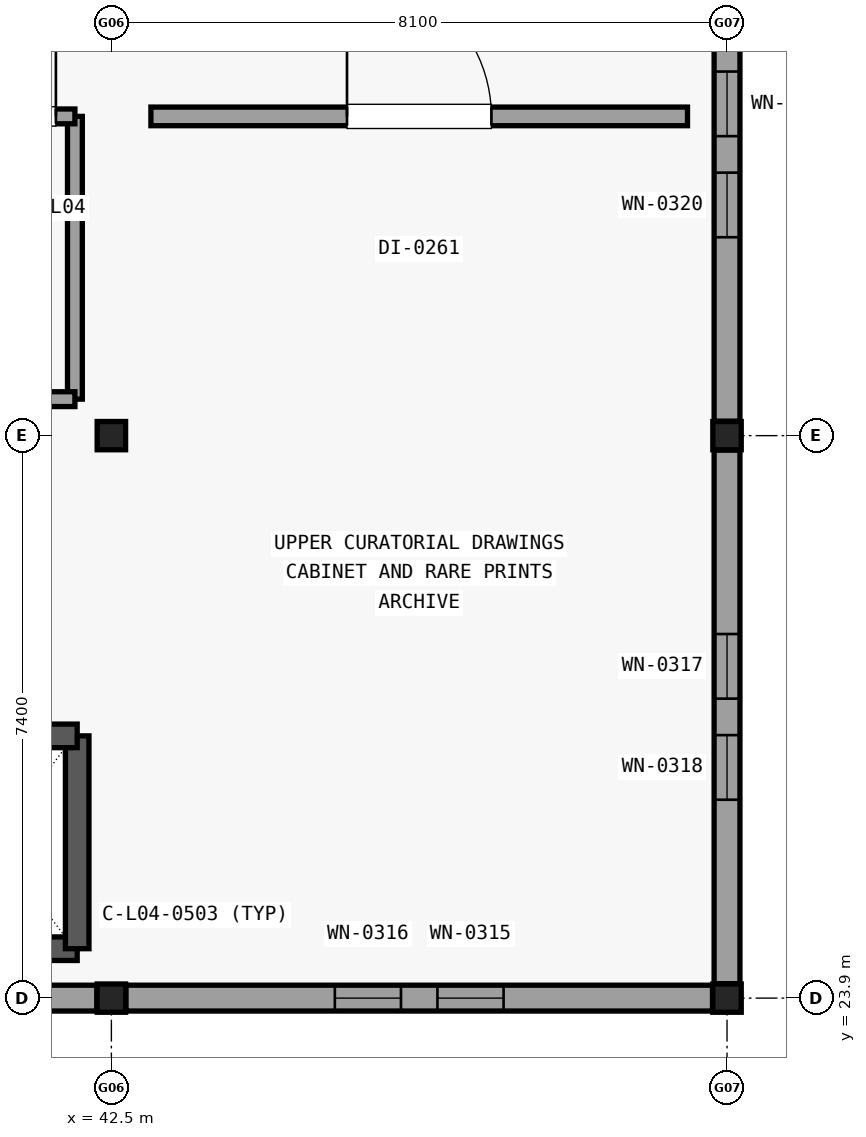
"""IFC4 building model, lengths in metres.
Left out: names, types, materials, properties, quantities, classifications, styles, units other than length and angle.
Written with IfcOpenShell. Run it as: python <this file> out.ifc"""

import sys

from ifc_helpers import new_model, si_unit, direction, frame, frame_2d, origin, origin_2d, place, context, subcontext, project, spatial, rectangle, i_section, extrude, element, fill, save


model = new_model("IFC4")
c1 = context("Model", 3, precision=1e-05, world=origin(), true_north=direction((0.0, 1.0)))
c2 = subcontext(c1, "Body", "Model", "MODEL_VIEW")
j1 = project(units=[si_unit("LENGTHUNIT", "METRE"), si_unit("PLANEANGLEUNIT", "RADIAN")], contexts=[c1])
p1 = place(None, origin())
s1 = spatial("IfcSite", under=j1, at=p1, CompositionType="ELEMENT")
p2 = place(p1, origin())
s2 = spatial("IfcBuilding", under=s1, at=p2, CompositionType="ELEMENT")
p3 = place(p2, frame((0.0, 0.0, 17.4)))
s3 = spatial("IfcBuildingStorey", under=s2, at=p3, CompositionType="ELEMENT", Elevation=17.4)
for number, where, z_axis, x_axis in (
    (1, (42.5, 23.9, 0.0), (0.0, 0.0, 1.0), (1.0, 0.0, 0.0)),
    (2, (42.5, 31.3, 0.0), (0.0, 0.0, 1.0), (1.0, 0.0, 0.0)),
    (3, (50.6, 23.9, 0.0), (0.0, 0.0, 1.0), (1.0, 0.0, 0.0)),
    (4, (50.6, 31.3, 0.0), (0.0, 0.0, 1.0), (1.0, 0.0, 0.0)),
):
    element("IfcColumn", number, at=place(p3, frame(where, z_axis=z_axis, x_axis=x_axis)), inside=s3, PredefinedType="COLUMN", context=c2, shape_type="SweptSolid", body=[
        extrude(i_section(OverallWidth=0.374, OverallDepth=0.372, WebThickness=0.016, FlangeThickness=0.026, at=origin_2d()), origin(), (0.0, 0.0, 1.0), 3.38),
    ])
p4 = place(p3, frame((42.309, 23.9, 0.0), z_axis=(0.0, 0.0, 1.0), x_axis=(-1.0, 0.0, 0.0)))
e5 = element("IfcWall", 5, at=p4, inside=s3, PredefinedType="SOLIDWALL", context=c2, shape_type="SweptSolid", body=[
    extrude(rectangle(XDim=7.719, YDim=0.34, at=frame_2d((3.86, 0.0))), origin(), (0.0, 0.0, 1.0), 2.908),
])
p5 = place(p4, frame((2.75, 0.0, 0.6)))
e6 = element("IfcOpeningElement", 6, at=p5, cuts=e5, PredefinedType="OPENING", context=c2, shape_type="SweptSolid", body=[
    extrude(rectangle(XDim=0.87, YDim=1.82, at=frame_2d((0.435, 0.91))), frame((0.0, 0.18, 0.0), z_axis=(0.0, -1.0, 0.0), x_axis=(1.0, 0.0, 0.0)), (0.0, 0.0, 1.0), 0.36),
])
p6 = place(p4, frame((4.1, 0.0, 0.6)))
e7 = element("IfcOpeningElement", 7, at=p6, cuts=e5, PredefinedType="OPENING", context=c2, shape_type="SweptSolid", body=[
    extrude(rectangle(XDim=0.87, YDim=1.82, at=frame_2d((0.435, 0.91))), frame((0.0, 0.18, 0.0), z_axis=(0.0, -1.0, 0.0), x_axis=(1.0, 0.0, 0.0)), (0.0, 0.0, 1.0), 0.36),
])
p7 = place(p3, frame((50.409, 23.9, 0.0), z_axis=(0.0, 0.0, 1.0), x_axis=(-1.0, 0.0, 0.0)))
e8 = element("IfcWall", 8, at=p7, inside=s3, PredefinedType="SOLIDWALL", context=c2, shape_type="SweptSolid", body=[
    extrude(rectangle(XDim=7.718, YDim=0.34, at=frame_2d((3.859, 0.0))), origin(), (0.0, 0.0, 1.0), 2.908),
])
p8 = place(p7, frame((2.749, 0.0, 0.6)))
e9 = element("IfcOpeningElement", 9, at=p8, cuts=e8, PredefinedType="OPENING", context=c2, shape_type="SweptSolid", body=[
    extrude(rectangle(XDim=0.87, YDim=1.82, at=frame_2d((0.435, 0.91))), frame((0.0, 0.18, 0.0), z_axis=(0.0, -1.0, 0.0), x_axis=(1.0, 0.0, 0.0)), (0.0, 0.0, 1.0), 0.36),
])
p9 = place(p7, frame((4.099, 0.0, 0.6)))
e10 = element("IfcOpeningElement", 10, at=p9, cuts=e8, PredefinedType="OPENING", context=c2, shape_type="SweptSolid", body=[
    extrude(rectangle(XDim=0.87, YDim=1.82, at=frame_2d((0.435, 0.91))), frame((0.0, 0.18, 0.0), z_axis=(0.0, -1.0, 0.0), x_axis=(1.0, 0.0, 0.0)), (0.0, 0.0, 1.0), 0.36),
])
p10 = place(p3, frame((50.6, 31.11, 0.0), z_axis=(0.0, 0.0, 1.0), x_axis=(0.0, -1.0, 0.0)))
e11 = element("IfcWall", 11, at=p10, inside=s3, PredefinedType="SOLIDWALL", context=c2, shape_type="SweptSolid", body=[
    extrude(rectangle(XDim=7.02, YDim=0.34, at=frame_2d((3.51, 0.0))), origin(), (0.0, 0.0, 1.0), 2.908),
])
p11 = place(p10, frame((2.42, 0.0, 0.6)))
e12 = element("IfcOpeningElement", 12, at=p11, cuts=e11, PredefinedType="OPENING", context=c2, shape_type="SweptSolid", body=[
    extrude(rectangle(XDim=0.85, YDim=1.88, at=frame_2d((0.425, 0.94))), frame((0.0, 0.18, 0.0), z_axis=(0.0, -1.0, 0.0), x_axis=(1.0, 0.0, 0.0)), (0.0, 0.0, 1.0), 0.36),
])
p12 = place(p10, frame((3.75, 0.0, 0.6)))
e13 = element("IfcOpeningElement", 13, at=p12, cuts=e11, PredefinedType="OPENING", context=c2, shape_type="SweptSolid", body=[
    extrude(rectangle(XDim=0.85, YDim=1.88, at=frame_2d((0.425, 0.94))), frame((0.0, 0.18, 0.0), z_axis=(0.0, -1.0, 0.0), x_axis=(1.0, 0.0, 0.0)), (0.0, 0.0, 1.0), 0.36),
])
p13 = place(p3, frame((50.6, 38.51, 0.0), z_axis=(0.0, 0.0, 1.0), x_axis=(0.0, -1.0, 0.0)))
e14 = element("IfcWall", 14, at=p13, inside=s3, PredefinedType="SOLIDWALL", context=c2, shape_type="SweptSolid", body=[
    extrude(rectangle(XDim=7.02, YDim=0.34, at=frame_2d((3.51, 0.0))), origin(), (0.0, 0.0, 1.0), 2.908),
])
p14 = place(p13, frame((2.42, 0.0, 0.6)))
e15 = element("IfcOpeningElement", 15, at=p14, cuts=e14, PredefinedType="OPENING", context=c2, shape_type="SweptSolid", body=[
    extrude(rectangle(XDim=0.85, YDim=1.88, at=frame_2d((0.425, 0.94))), frame((0.0, 0.18, 0.0), z_axis=(0.0, -1.0, 0.0), x_axis=(1.0, 0.0, 0.0)), (0.0, 0.0, 1.0), 0.36),
])
p15 = place(p13, frame((3.75, 0.0, 0.6)))
e16 = element("IfcOpeningElement", 16, at=p15, cuts=e14, PredefinedType="OPENING", context=c2, shape_type="SweptSolid", body=[
    extrude(rectangle(XDim=0.85, YDim=1.88, at=frame_2d((0.425, 0.94))), frame((0.0, 0.18, 0.0), z_axis=(0.0, -1.0, 0.0), x_axis=(1.0, 0.0, 0.0)), (0.0, 0.0, 1.0), 0.36),
])
p16 = place(p3, frame((39.85, 24.55, 0.0), z_axis=(0.0, 0.0, 1.0), x_axis=(1.0, 0.0, 0.0)))
e17 = element("IfcWall", 17, at=p16, inside=s3, PredefinedType="SHEAR", context=c2, shape_type="SweptSolid", body=[
    extrude(rectangle(XDim=2.2, YDim=0.31, at=frame_2d((1.1, 0.0))), origin(), (0.0, 0.0, 1.0), 3.375),
])
p17 = place(p3, frame((42.05, 24.55, 0.0), z_axis=(0.0, 0.0, 1.0), x_axis=(0.0, 1.0, 0.0)))
e18 = element("IfcWall", 18, at=p17, inside=s3, PredefinedType="SHEAR", context=c2, shape_type="SweptSolid", body=[
    extrude(rectangle(XDim=2.8, YDim=0.31, at=frame_2d((1.4, 0.0))), origin(), (0.0, 0.0, 1.0), 3.375),
])
p18 = place(p3, frame((39.85, 27.35, 0.0), z_axis=(0.0, 0.0, 1.0), x_axis=(1.0, 0.0, 0.0)))
e19 = element("IfcWall", 19, at=p18, inside=s3, PredefinedType="SHEAR", context=c2, shape_type="SweptSolid", body=[
    extrude(rectangle(XDim=2.2, YDim=0.31, at=frame_2d((1.1, 0.0))), origin(), (0.0, 0.0, 1.0), 3.375),
])
p19 = place(p18, frame((0.5, 0.0, 0.0)))
e20 = element("IfcOpeningElement", 20, at=p19, cuts=e19, PredefinedType="OPENING", context=c2, shape_type="SweptSolid", body=[
    extrude(rectangle(XDim=1.2, YDim=2.15, at=frame_2d((0.6, 1.075))), frame((0.0, 0.165, 0.0), z_axis=(0.0, -1.0, 0.0), x_axis=(1.0, 0.0, 0.0)), (0.0, 0.0, 1.0), 0.33),
])
p20 = place(p3, frame((42.02, 31.78, 0.0), z_axis=(0.0, 0.0, 1.0), x_axis=(0.0, 1.0, 0.0)))
e21 = element("IfcWall", 21, at=p20, inside=s3, PredefinedType="PARTITIONING", context=c2, shape_type="SweptSolid", body=[
    extrude(rectangle(XDim=3.72, YDim=0.195, at=frame_2d((1.86, 0.0))), origin(), (0.0, 0.0, 1.0), 2.913),
])
p21 = place(p3, frame((39.05, 31.78, 0.0), z_axis=(0.0, 0.0, 1.0), x_axis=(1.0, 0.0, 0.0)))
e22 = element("IfcWall", 22, at=p21, inside=s3, PredefinedType="PARTITIONING", context=c2, shape_type="SweptSolid", body=[
    extrude(rectangle(XDim=2.97, YDim=0.195, at=frame_2d((1.485, 0.0))), origin(), (0.0, 0.0, 1.0), 2.913),
])
p22 = place(p3, frame((39.05, 35.5, 0.0), z_axis=(0.0, 0.0, 1.0), x_axis=(1.0, 0.0, 0.0)))
e23 = element("IfcWall", 23, at=p22, inside=s3, PredefinedType="PARTITIONING", context=c2, shape_type="SweptSolid", body=[
    extrude(rectangle(XDim=2.97, YDim=0.195, at=frame_2d((1.485, 0.0))), origin(), (0.0, 0.0, 1.0), 2.913),
])
p23 = place(p22, frame((0.25, 0.0, 0.0)))
e24 = element("IfcOpeningElement", 24, at=p23, cuts=e23, PredefinedType="OPENING", context=c2, shape_type="SweptSolid", body=[
    extrude(rectangle(XDim=0.95, YDim=2.1, at=frame_2d((0.475, 1.05))), frame((0.0, 0.107, 0.0), z_axis=(0.0, -1.0, 0.0), x_axis=(1.0, 0.0, 0.0)), (0.0, 0.0, 1.0), 0.215),
])
p24 = place(p22, frame((1.82, 0.0, 0.0)))
e25 = element("IfcOpeningElement", 25, at=p24, cuts=e23, PredefinedType="OPENING", context=c2, shape_type="SweptSolid", body=[
    extrude(rectangle(XDim=0.9, YDim=2.1, at=frame_2d((0.45, 1.05))), frame((0.0, 0.107, 0.0), z_axis=(0.0, -1.0, 0.0), x_axis=(1.0, 0.0, 0.0)), (0.0, 0.0, 1.0), 0.215),
])
p25 = place(p3, frame((43.02, 35.5, 0.0), z_axis=(0.0, 0.0, 1.0), x_axis=(1.0, 0.0, 0.0)))
e26 = element("IfcWall", 26, at=p25, inside=s3, PredefinedType="PARTITIONING", context=c2, shape_type="SweptSolid", body=[
    extrude(rectangle(XDim=7.06, YDim=0.245, at=frame_2d((3.53, 0.0))), origin(), (0.0, 0.0, 1.0), 2.913),
])
p26 = place(p25, frame((2.58, 0.0, 0.0)))
e27 = element("IfcOpeningElement", 27, at=p26, cuts=e26, PredefinedType="OPENING", context=c2, shape_type="SweptSolid", body=[
    extrude(rectangle(XDim=1.9, YDim=2.25, at=frame_2d((0.95, 1.125))), frame((0.0, 0.133, 0.0), z_axis=(0.0, -1.0, 0.0), x_axis=(1.0, 0.0, 0.0)), (0.0, 0.0, 1.0), 0.265),
])
p27 = place(p8, origin())
e28 = element("IfcWindow", 28, at=p27, inside=s3, PartitioningType="SINGLE_PANEL", PredefinedType="WINDOW", context=c2, shape_type="SweptSolid", body=[
    extrude(rectangle(XDim=0.87, YDim=1.82, at=frame_2d((0.435, 0.91))), frame((0.0, 0.03, 0.0), z_axis=(0.0, -1.0, 0.0), x_axis=(1.0, 0.0, 0.0)), (0.0, 0.0, 1.0), 0.06),
])
fill(e9, e28)
p28 = place(p9, origin())
e29 = element("IfcWindow", 29, at=p28, inside=s3, PartitioningType="SINGLE_PANEL", PredefinedType="WINDOW", context=c2, shape_type="SweptSolid", body=[
    extrude(rectangle(XDim=0.87, YDim=1.82, at=frame_2d((0.435, 0.91))), frame((0.0, 0.03, 0.0), z_axis=(0.0, -1.0, 0.0), x_axis=(1.0, 0.0, 0.0)), (0.0, 0.0, 1.0), 0.06),
])
fill(e10, e29)
p29 = place(p11, origin())
e30 = element("IfcWindow", 30, at=p29, inside=s3, PartitioningType="SINGLE_PANEL", PredefinedType="WINDOW", context=c2, shape_type="SweptSolid", body=[
    extrude(rectangle(XDim=0.85, YDim=1.88, at=frame_2d((0.425, 0.94))), frame((0.0, 0.03, 0.0), z_axis=(0.0, -1.0, 0.0), x_axis=(1.0, 0.0, 0.0)), (0.0, 0.0, 1.0), 0.06),
])
fill(e12, e30)
p30 = place(p12, origin())
e31 = element("IfcWindow", 31, at=p30, inside=s3, PartitioningType="SINGLE_PANEL", PredefinedType="WINDOW", context=c2, shape_type="SweptSolid", body=[
    extrude(rectangle(XDim=0.85, YDim=1.88, at=frame_2d((0.425, 0.94))), frame((0.0, 0.03, 0.0), z_axis=(0.0, -1.0, 0.0), x_axis=(1.0, 0.0, 0.0)), (0.0, 0.0, 1.0), 0.06),
])
fill(e13, e31)
p31 = place(p14, origin())
e32 = element("IfcWindow", 32, at=p31, inside=s3, PartitioningType="SINGLE_PANEL", PredefinedType="WINDOW", context=c2, shape_type="SweptSolid", body=[
    extrude(rectangle(XDim=0.85, YDim=1.88, at=frame_2d((0.425, 0.94))), frame((0.0, 0.03, 0.0), z_axis=(0.0, -1.0, 0.0), x_axis=(1.0, 0.0, 0.0)), (0.0, 0.0, 1.0), 0.06),
])
fill(e15, e32)
p32 = place(p15, origin())
e33 = element("IfcWindow", 33, at=p32, inside=s3, PartitioningType="SINGLE_PANEL", PredefinedType="WINDOW", context=c2, shape_type="SweptSolid", body=[
    extrude(rectangle(XDim=0.85, YDim=1.88, at=frame_2d((0.425, 0.94))), frame((0.0, 0.03, 0.0), z_axis=(0.0, -1.0, 0.0), x_axis=(1.0, 0.0, 0.0)), (0.0, 0.0, 1.0), 0.06),
])
fill(e16, e33)
p33 = place(p24, origin())
e34 = element("IfcDoor", 34, at=p33, inside=s3, OperationType="SINGLE_SWING_RIGHT", PredefinedType="DOOR", context=c2, shape_type="SweptSolid", body=[
    extrude(rectangle(XDim=0.9, YDim=2.1, at=frame_2d((0.45, 1.05))), frame((0.0, 0.025, 0.0), z_axis=(0.0, -1.0, 0.0), x_axis=(1.0, 0.0, 0.0)), (0.0, 0.0, 1.0), 0.05),
])
fill(e25, e34)
p34 = place(p26, origin())
e35 = element("IfcDoor", 35, at=p34, inside=s3, OperationType="SINGLE_SWING_LEFT", PredefinedType="DOOR", context=c2, shape_type="SweptSolid", body=[
    extrude(rectangle(XDim=1.9, YDim=2.25, at=frame_2d((0.95, 1.125))), frame((0.0, 0.025, 0.0), z_axis=(0.0, -1.0, 0.0), x_axis=(1.0, 0.0, 0.0)), (0.0, 0.0, 1.0), 0.05),
])
fill(e27, e35)
save(model, sys.argv[1])
